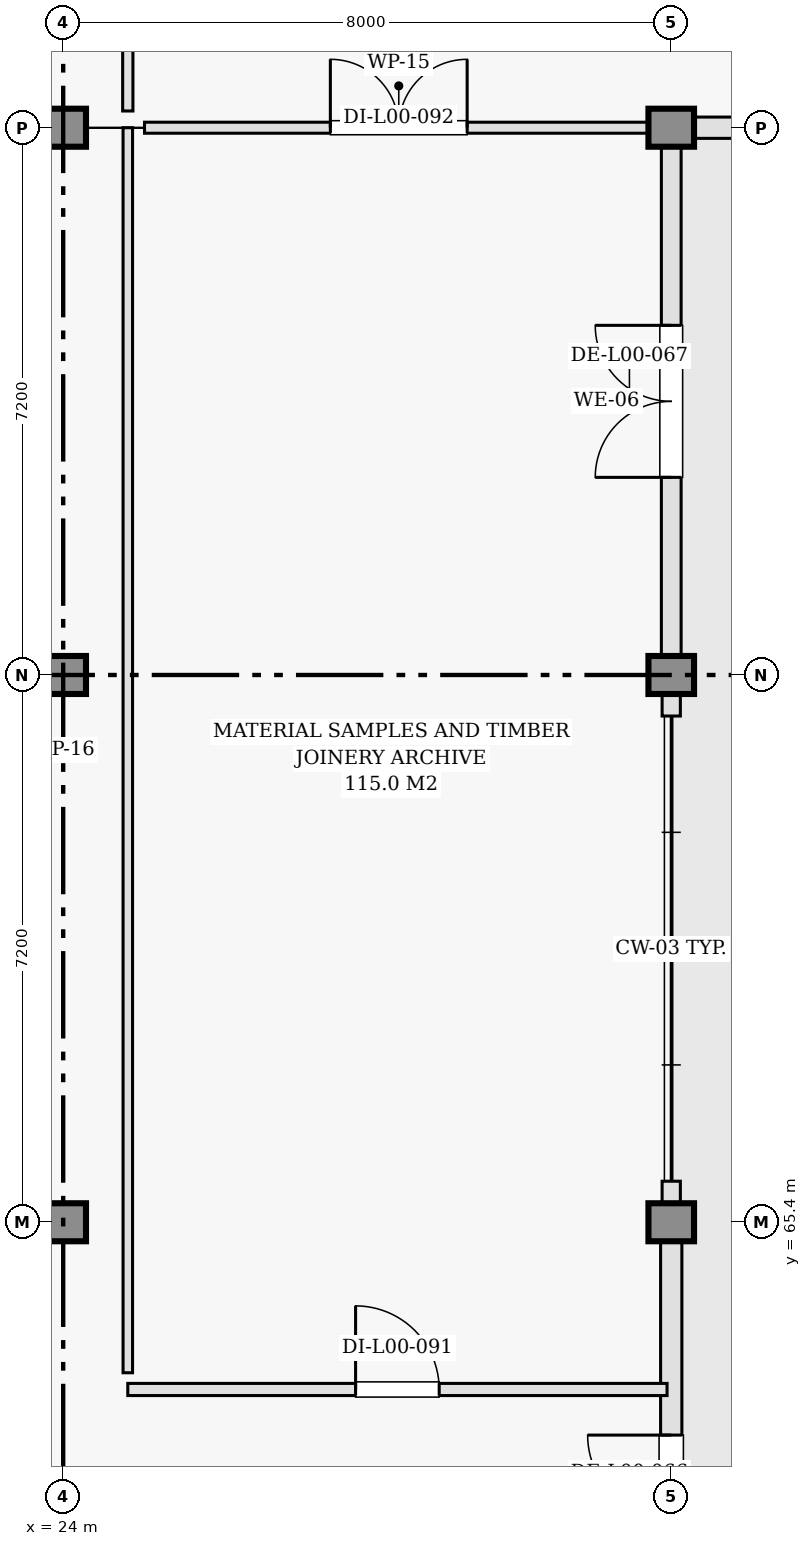
"""IFC4 building model, lengths in metres.
Left out: names, types, materials, properties, quantities, classifications, styles, units other than length and angle.
Written with IfcOpenShell. Run it as: python <this file> out.ifc"""

import sys

from ifc_helpers import new_model, si_unit, direction, frame, frame_2d, origin, origin_2d, place, context, subcontext, project, spatial, rectangle, extrude, element, fill, save


model = new_model("IFC4")
c1 = context("Model", 3, precision=1e-05, world=origin(), true_north=direction((0.0, 1.0)))
c2 = subcontext(c1, "Body", "Model", "MODEL_VIEW")
j1 = project(units=[si_unit("LENGTHUNIT", "METRE"), si_unit("PLANEANGLEUNIT", "RADIAN")], contexts=[c1])
p1 = place(None, origin())
s1 = spatial("IfcSite", under=j1, at=p1, CompositionType="ELEMENT")
p2 = place(p1, origin())
s2 = spatial("IfcBuilding", under=s1, at=p2, CompositionType="ELEMENT")
p3 = place(p2, origin())
s3 = spatial("IfcBuildingStorey", under=s2, at=p3, CompositionType="ELEMENT", Elevation=0.0)
for number, where, z_axis, x_axis in (
    (1, (24.0, 65.4, 0.0), (0.0, 0.0, 1.0), (1.0, 0.0, 0.0)),
    (2, (24.0, 72.6, 0.0), (0.0, 0.0, 1.0), (1.0, 0.0, 0.0)),
    (3, (24.0, 79.8, 0.0), (0.0, 0.0, 1.0), (1.0, 0.0, 0.0)),
    (4, (32.0, 65.4, 0.0), (0.0, 0.0, 1.0), (1.0, 0.0, 0.0)),
    (5, (32.0, 72.6, 0.0), (0.0, 0.0, 1.0), (1.0, 0.0, 0.0)),
    (6, (32.0, 79.8, 0.0), (0.0, 0.0, 1.0), (1.0, 0.0, 0.0)),
):
    element("IfcColumn", number, at=place(p3, frame(where, z_axis=z_axis, x_axis=x_axis)), inside=s3, PredefinedType="COLUMN", context=c2, shape_type="SweptSolid", body=[
        extrude(rectangle(XDim=0.5, YDim=0.5, at=origin_2d()), origin(), (0.0, 0.0, 1.0), 4.8),
    ])
p4 = place(p3, frame((32.0, 57.6, 0.0), z_axis=(0.0, 0.0, 1.0), x_axis=(0.0, 1.0, 0.0)))
e7 = element("IfcWall", 7, at=p4, inside=s3, PredefinedType="SOLIDWALL", context=c2, shape_type="SweptSolid", body=[
    extrude(rectangle(XDim=7.8, YDim=0.28, at=frame_2d((3.9, 0.0))), origin(), (0.0, 0.0, 1.0), 3.805),
])
p5 = place(p4, frame((2.8, 0.0, 0.0)))
e8 = element("IfcOpeningElement", 8, at=p5, cuts=e7, PredefinedType="OPENING", context=c2, shape_type="SweptSolid", body=[
    extrude(rectangle(XDim=2.2, YDim=2.35, at=frame_2d((1.1, 1.175))), frame((0.0, 0.15, 0.0), z_axis=(0.0, -1.0, 0.0), x_axis=(1.0, 0.0, 0.0)), (0.0, 0.0, 1.0), 0.3),
])
for number, where, z_axis, x_axis in (
    (9, (32.0, 65.4, 0.0), (0.0, 0.0, 1.0), (0.0, 1.0, 0.0)),
    (10, (32.0, 72.06, 0.0), (0.0, 0.0, 1.0), (0.0, 1.0, 0.0)),
):
    element("IfcWall", number, at=place(p3, frame(where, z_axis=z_axis, x_axis=x_axis)), inside=s3, PredefinedType="SOLIDWALL", context=c2, shape_type="SweptSolid", body=[
        extrude(rectangle(XDim=0.54, YDim=0.24, at=frame_2d((0.27, 0.0))), origin(), (0.0, 0.0, 1.0), 3.805),
    ])
p6 = place(p3, frame((32.0, 72.6, 0.0), z_axis=(0.0, 0.0, 1.0), x_axis=(0.0, 1.0, 0.0)))
e11 = element("IfcWall", 11, at=p6, inside=s3, PredefinedType="SOLIDWALL", context=c2, shape_type="SweptSolid", body=[
    extrude(rectangle(XDim=7.2, YDim=0.26, at=frame_2d((3.6, 0.0))), origin(), (0.0, 0.0, 1.0), 3.805),
])
p7 = place(p6, frame((2.6, 0.0, 0.0)))
e12 = element("IfcOpeningElement", 12, at=p7, cuts=e11, PredefinedType="OPENING", context=c2, shape_type="SweptSolid", body=[
    extrude(rectangle(XDim=2.0, YDim=2.3, at=frame_2d((1.0, 1.15))), frame((0.0, 0.14, 0.0), z_axis=(0.0, -1.0, 0.0), x_axis=(1.0, 0.0, 0.0)), (0.0, 0.0, 1.0), 0.28),
])
p8 = place(p3, frame((32.0, 79.8, 0.0), z_axis=(0.0, 0.0, 1.0), x_axis=(1.0, 0.0, 0.0)))
e13 = element("IfcWall", 13, at=p8, inside=s3, PredefinedType="SOLIDWALL", context=c2, shape_type="SweptSolid", body=[
    extrude(rectangle(XDim=8.0, YDim=0.28, at=frame_2d((4.0, 0.0))), origin(), (0.0, 0.0, 1.0), 3.805),
])
p9 = place(p8, frame((3.1, 0.0, 0.0)))
e14 = element("IfcOpeningElement", 14, at=p9, cuts=e13, PredefinedType="OPENING", context=c2, shape_type="SweptSolid", body=[
    extrude(rectangle(XDim=1.8, YDim=2.2, at=frame_2d((0.9, 1.1))), frame((0.0, 0.15, 0.0), z_axis=(0.0, -1.0, 0.0), x_axis=(1.0, 0.0, 0.0)), (0.0, 0.0, 1.0), 0.3),
])
p10 = place(p3, frame((24.85, 63.2, 0.0), z_axis=(0.0, 0.0, 1.0), x_axis=(1.0, 0.0, 0.0)))
e15 = element("IfcWall", 15, at=p10, inside=s3, PredefinedType="PARTITIONING", context=c2, shape_type="SweptSolid", body=[
    extrude(rectangle(XDim=7.095, YDim=0.16, at=frame_2d((3.547, 0.0))), origin(), (0.0, 0.0, 1.0), 3.955),
])
p11 = place(p10, frame((2.997, 0.0, 0.0)))
e16 = element("IfcOpeningElement", 16, at=p11, cuts=e15, PredefinedType="OPENING", context=c2, shape_type="SweptSolid", body=[
    extrude(rectangle(XDim=1.1, YDim=2.15, at=frame_2d((0.55, 1.075))), frame((0.0, 0.09, 0.0), z_axis=(0.0, -1.0, 0.0), x_axis=(1.0, 0.0, 0.0)), (0.0, 0.0, 1.0), 0.18),
])
p12 = place(p3, frame((24.85, 63.42, 0.0), z_axis=(0.0, 0.0, 1.0), x_axis=(0.0, 1.0, 0.0)))
e17 = element("IfcWall", 17, at=p12, inside=s3, PredefinedType="PARTITIONING", context=c2, shape_type="SweptSolid", body=[
    extrude(rectangle(XDim=16.38, YDim=0.125, at=frame_2d((8.19, 0.0))), origin(), (0.0, 0.0, 1.0), 3.805),
])
p13 = place(p3, frame((25.07, 79.8, 0.0), z_axis=(0.0, 0.0, 1.0), x_axis=(1.0, 0.0, 0.0)))
e18 = element("IfcWall", 18, at=p13, inside=s3, PredefinedType="PARTITIONING", context=c2, shape_type="SweptSolid", body=[
    extrude(rectangle(XDim=6.69, YDim=0.145, at=frame_2d((3.345, 0.0))), origin(), (0.0, 0.0, 1.0), 3.805),
])
p14 = place(p13, frame((2.445, 0.0, 0.0)))
e19 = element("IfcOpeningElement", 19, at=p14, cuts=e18, PredefinedType="OPENING", context=c2, shape_type="SweptSolid", body=[
    extrude(rectangle(XDim=1.8, YDim=2.2, at=frame_2d((0.9, 1.1))), frame((0.0, 0.083, 0.0), z_axis=(0.0, -1.0, 0.0), x_axis=(1.0, 0.0, 0.0)), (0.0, 0.0, 1.0), 0.165),
])
p15 = place(p3, frame((24.85, 80.02, 0.0), z_axis=(0.0, 0.0, 1.0), x_axis=(0.0, 1.0, 0.0)))
e20 = element("IfcWall", 20, at=p15, inside=s3, PredefinedType="PARTITIONING", context=c2, shape_type="SweptSolid", body=[
    extrude(rectangle(XDim=13.875, YDim=0.135, at=frame_2d((6.938, 0.0))), origin(), (0.0, 0.0, 1.0), 3.805),
])
p16 = place(p5, frame((2.2, 0.0, 0.0), z_axis=(0.0, 0.0, 1.0), x_axis=(-1.0, 0.0, 0.0)))
e21 = element("IfcDoor", 21, at=p16, inside=s3, OperationType="DOUBLE_DOOR_SINGLE_SWING", PredefinedType="DOOR", context=c2, shape_type="SweptSolid", body=[
    extrude(rectangle(XDim=2.2, YDim=2.35, at=frame_2d((1.1, 1.175))), frame((0.0, 0.025, 0.0), z_axis=(0.0, -1.0, 0.0), x_axis=(1.0, 0.0, 0.0)), (0.0, 0.0, 1.0), 0.05),
])
fill(e8, e21)
p17 = place(p7, origin())
e22 = element("IfcDoor", 22, at=p17, inside=s3, OperationType="DOUBLE_DOOR_SINGLE_SWING", PredefinedType="DOOR", context=c2, shape_type="SweptSolid", body=[
    extrude(rectangle(XDim=2.0, YDim=2.3, at=frame_2d((1.0, 1.15))), frame((0.0, 0.025, 0.0), z_axis=(0.0, -1.0, 0.0), x_axis=(1.0, 0.0, 0.0)), (0.0, 0.0, 1.0), 0.05),
])
fill(e12, e22)
p18 = place(p11, origin())
e23 = element("IfcDoor", 23, at=p18, inside=s3, OperationType="SINGLE_SWING_LEFT", PredefinedType="DOOR", context=c2, shape_type="SweptSolid", body=[
    extrude(rectangle(XDim=1.1, YDim=2.15, at=frame_2d((0.55, 1.075))), frame((0.0, 0.025, 0.0), z_axis=(0.0, -1.0, 0.0), x_axis=(1.0, 0.0, 0.0)), (0.0, 0.0, 1.0), 0.05),
])
fill(e16, e23)
p19 = place(p14, origin())
e24 = element("IfcDoor", 24, at=p19, inside=s3, OperationType="DOUBLE_DOOR_SINGLE_SWING", PredefinedType="DOOR", context=c2, shape_type="SweptSolid", body=[
    extrude(rectangle(XDim=1.8, YDim=2.2, at=frame_2d((0.9, 1.1))), frame((0.0, 0.025, 0.0), z_axis=(0.0, -1.0, 0.0), x_axis=(1.0, 0.0, 0.0)), (0.0, 0.0, 1.0), 0.05),
])
fill(e19, e24)
save(model, sys.argv[1])
